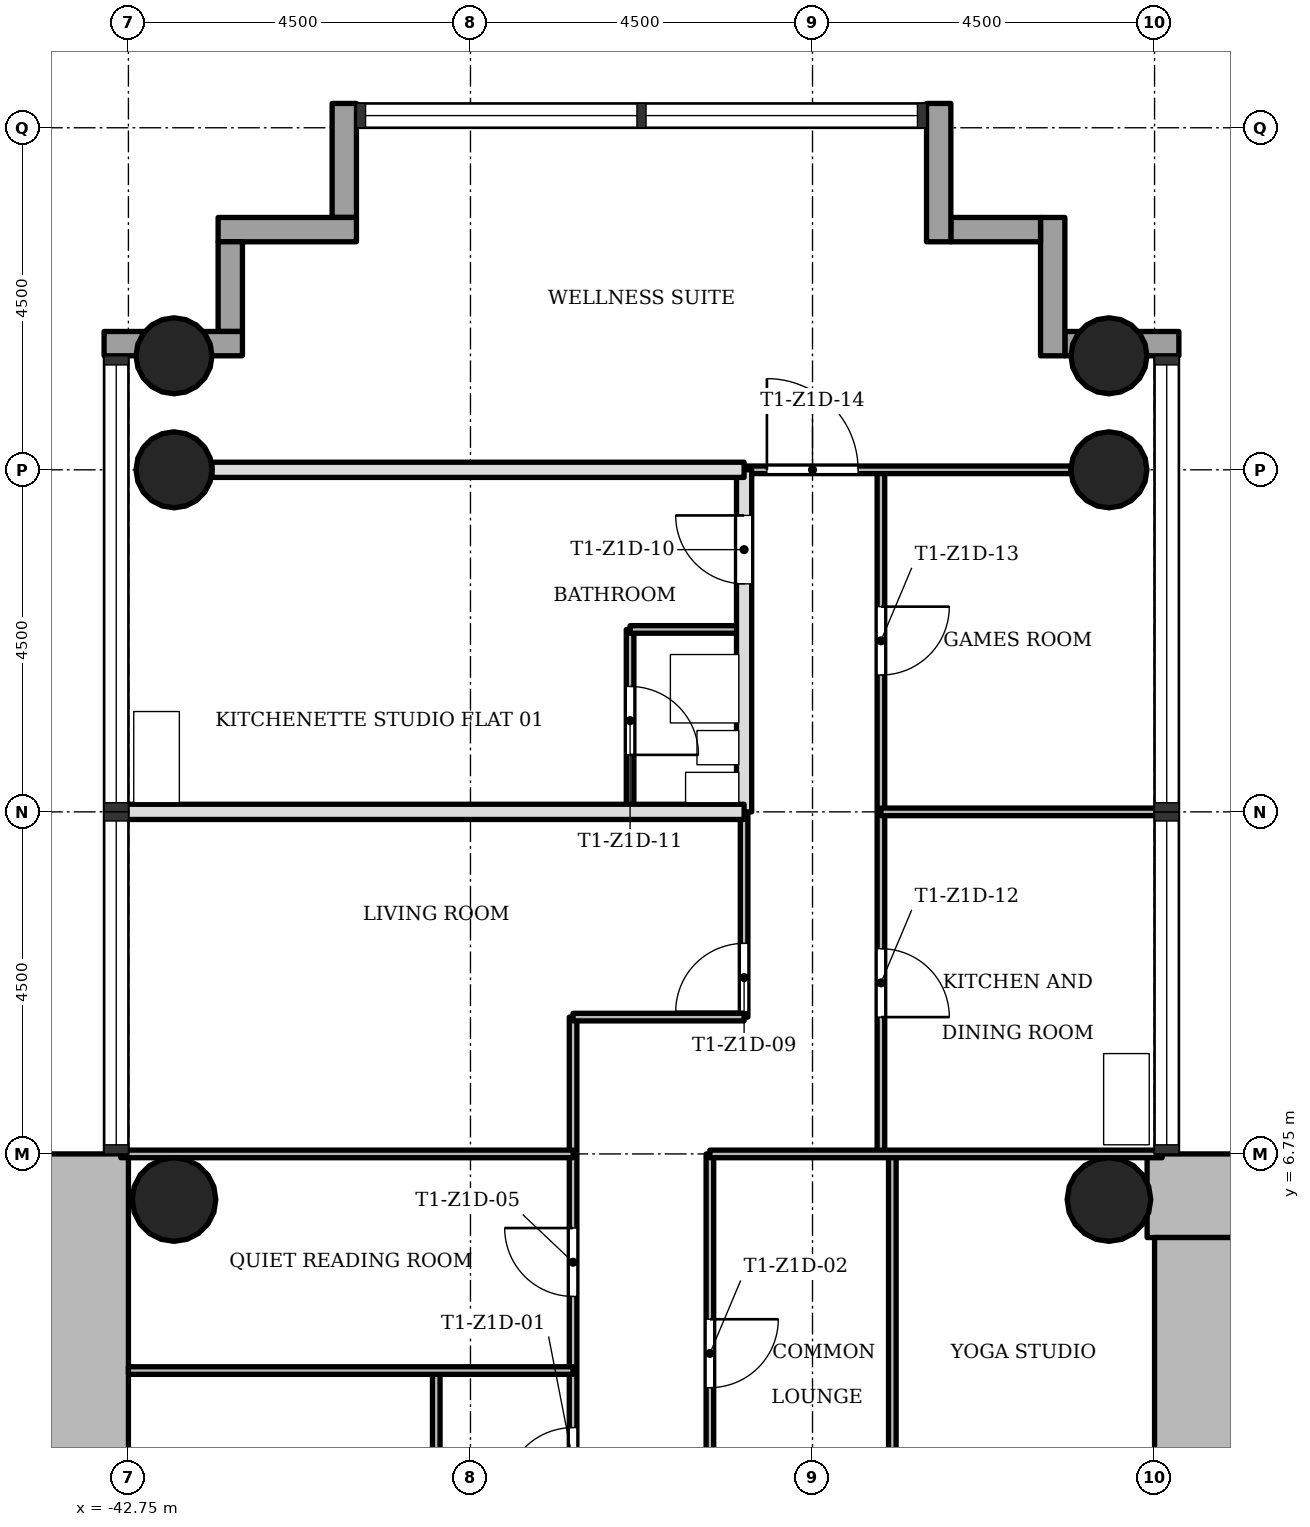
"""IFC4 building model, lengths in metres.
Left out: names, types, materials, properties, quantities, classifications, styles, units other than length and angle.
Written with IfcOpenShell. Run it as: python <this file> out.ifc"""

import sys

from ifc_helpers import new_model, si_unit, direction, frame, frame_2d, origin, origin_2d, place, context, subcontext, project, spatial, rectangle, hollow_circle, extrude, element, fill, save


model = new_model("IFC4")
c1 = context("Model", 3, precision=1e-05, world=origin(), true_north=direction((0.0, 1.0)))
c2 = subcontext(c1, "Body", "Model", "MODEL_VIEW")
j1 = project(units=[si_unit("LENGTHUNIT", "METRE"), si_unit("PLANEANGLEUNIT", "RADIAN")], contexts=[c1])
p1 = place(None, origin())
s1 = spatial("IfcSite", under=j1, at=p1, CompositionType="ELEMENT")
p2 = place(p1, origin())
s2 = spatial("IfcBuilding", under=s1, at=p2, CompositionType="ELEMENT")
p3 = place(p2, frame((0.0, 0.0, 61.9)))
s3 = spatial("IfcBuildingStorey", under=s2, at=p3, CompositionType="ELEMENT", Elevation=61.9)
p4 = place(p3, frame((-21.35, 6.2, 0.0), z_axis=(0.0, 0.0, 1.0), x_axis=(-1.0, 0.0, 0.0)))
e1 = element("IfcWall", 1, at=p4, inside=s3, PredefinedType="SHEAR", context=c2, shape_type="SweptSolid", body=[
    extrude(rectangle(XDim=7.998, YDim=1.1, at=frame_2d((3.999, 0.0))), origin(), (0.0, 0.0, 1.0), 3.4),
])
p5 = place(p3, frame((-28.7, 5.65, 0.0), z_axis=(0.0, 0.0, 1.0), x_axis=(0.0, -1.0, 0.0)))
e2 = element("IfcWall", 2, at=p5, inside=s3, PredefinedType="SHEAR", context=c2, shape_type="SweptSolid", body=[
    extrude(rectangle(XDim=12.4, YDim=1.1, at=frame_2d((6.2, 0.0))), origin(), (0.0, 0.0, 1.0), 3.4),
])
p6 = place(p5, frame((4.75, 0.0, 0.0)))
e3 = element("IfcOpeningElement", 3, at=p6, cuts=e2, PredefinedType="OPENING", context=c2, shape_type="SweptSolid", body=[
    extrude(rectangle(XDim=1.8, YDim=2.1, at=frame_2d((0.9, 1.05))), frame((0.0, 0.56, 0.0), z_axis=(0.0, -1.0, 0.0), x_axis=(1.0, 0.0, 0.0)), (0.0, 0.0, 1.0), 1.12),
])
p7 = place(p3, frame((-43.3, -5.65, 0.0), z_axis=(0.0, 0.0, 1.0), x_axis=(0.0, 1.0, 0.0)))
e4 = element("IfcWall", 4, at=p7, inside=s3, PredefinedType="SHEAR", context=c2, shape_type="SweptSolid", body=[
    extrude(rectangle(XDim=12.4, YDim=1.1, at=frame_2d((6.2, 0.0))), origin(), (0.0, 0.0, 1.0), 3.4),
])
p8 = place(p7, frame((4.75, 0.0, 0.0)))
e5 = element("IfcOpeningElement", 5, at=p8, cuts=e4, PredefinedType="OPENING", context=c2, shape_type="SweptSolid", body=[
    extrude(rectangle(XDim=1.8, YDim=2.1, at=frame_2d((0.9, 1.05))), frame((0.0, 0.56, 0.0), z_axis=(0.0, -1.0, 0.0), x_axis=(1.0, 0.0, 0.0)), (0.0, 0.0, 1.0), 1.12),
])
for number, where, z_axis, x_axis in (
    (6, (-29.85, 15.75, 0.0), (0.0, 0.0, 1.0), (1.0, 0.0, 0.0)),
    (7, (-42.15, 15.75, 0.0), (0.0, 0.0, 1.0), (1.0, 0.0, 0.0)),
    (8, (-29.85, 17.25, 0.0), (0.0, 0.0, 1.0), (1.0, 0.0, 0.0)),
    (9, (-42.15, 17.25, 0.0), (0.0, 0.0, 1.0), (1.0, 0.0, 0.0)),
):
    element("IfcColumn", number, at=place(p3, frame(where, z_axis=z_axis, x_axis=x_axis)), inside=s3, PredefinedType="COLUMN", context=c2, shape_type="SweptSolid", body=[
        extrude(hollow_circle(Radius=0.5, WallThickness=0.036, at=origin_2d()), origin(), (0.0, 0.0, 1.0), 3.4),
    ])
for number, where, z_axis, x_axis in (
    (10, (-29.85, 6.15, 0.0), (0.0, 0.0, 1.0), (1.0, 0.0, 0.0)),
    (11, (-42.15, 6.15, 0.0), (0.0, 0.0, 1.0), (1.0, 0.0, 0.0)),
):
    element("IfcColumn", number, at=place(p3, frame(where, z_axis=z_axis, x_axis=x_axis)), inside=s3, PredefinedType="COLUMN", context=c2, shape_type="SweptSolid", body=[
        extrude(hollow_circle(Radius=0.55, WallThickness=0.04, at=origin_2d()), origin(), (0.0, 0.0, 1.0), 3.4),
    ])
p9 = place(p3, frame((-28.93, 17.41, -0.3), z_axis=(0.0, 0.0, 1.0), x_axis=(-1.0, 0.0, 0.0)))
e12 = element("IfcWall", 12, at=p9, inside=s3, PredefinedType="STANDARD", context=c2, shape_type="SweptSolid", body=[
    extrude(rectangle(XDim=1.5, YDim=0.32, at=frame_2d((0.75, 0.0))), origin(), (0.0, 0.0, 1.0), 3.4),
])
p10 = place(p3, frame((-30.59, 17.25, -0.3), z_axis=(0.0, 0.0, 1.0), x_axis=(0.0, 1.0, 0.0)))
e13 = element("IfcWall", 13, at=p10, inside=s3, PredefinedType="STANDARD", context=c2, shape_type="SweptSolid", body=[
    extrude(rectangle(XDim=1.82, YDim=0.32, at=frame_2d((0.91, 0.0))), origin(), (0.0, 0.0, 1.0), 3.4),
])
p11 = place(p3, frame((-30.75, 18.91, -0.3), z_axis=(0.0, 0.0, 1.0), x_axis=(-1.0, 0.0, 0.0)))
e14 = element("IfcWall", 14, at=p11, inside=s3, PredefinedType="STANDARD", context=c2, shape_type="SweptSolid", body=[
    extrude(rectangle(XDim=1.18, YDim=0.32, at=frame_2d((0.59, 0.0))), origin(), (0.0, 0.0, 1.0), 3.4),
])
p12 = place(p3, frame((-32.09, 18.75, -0.3), z_axis=(0.0, 0.0, 1.0), x_axis=(0.0, 1.0, 0.0)))
e15 = element("IfcWall", 15, at=p12, inside=s3, PredefinedType="STANDARD", context=c2, shape_type="SweptSolid", body=[
    extrude(rectangle(XDim=1.82, YDim=0.32, at=frame_2d((0.91, 0.0))), origin(), (0.0, 0.0, 1.0), 3.4),
])
p13 = place(p3, frame((-39.91, 20.57, -0.3), z_axis=(0.0, 0.0, 1.0), x_axis=(0.0, -1.0, 0.0)))
e16 = element("IfcWall", 16, at=p13, inside=s3, PredefinedType="STANDARD", context=c2, shape_type="SweptSolid", body=[
    extrude(rectangle(XDim=1.5, YDim=0.32, at=frame_2d((0.75, 0.0))), origin(), (0.0, 0.0, 1.0), 3.4),
])
p14 = place(p3, frame((-39.75, 18.91, -0.3), z_axis=(0.0, 0.0, 1.0), x_axis=(-1.0, 0.0, 0.0)))
e17 = element("IfcWall", 17, at=p14, inside=s3, PredefinedType="STANDARD", context=c2, shape_type="SweptSolid", body=[
    extrude(rectangle(XDim=1.82, YDim=0.32, at=frame_2d((0.91, 0.0))), origin(), (0.0, 0.0, 1.0), 3.4),
])
p15 = place(p3, frame((-41.41, 18.75, -0.3), z_axis=(0.0, 0.0, 1.0), x_axis=(0.0, -1.0, 0.0)))
e18 = element("IfcWall", 18, at=p15, inside=s3, PredefinedType="STANDARD", context=c2, shape_type="SweptSolid", body=[
    extrude(rectangle(XDim=1.18, YDim=0.32, at=frame_2d((0.59, 0.0))), origin(), (0.0, 0.0, 1.0), 3.4),
])
p16 = place(p3, frame((-41.25, 17.41, -0.3), z_axis=(0.0, 0.0, 1.0), x_axis=(-1.0, 0.0, 0.0)))
e19 = element("IfcWall", 19, at=p16, inside=s3, PredefinedType="STANDARD", context=c2, shape_type="SweptSolid", body=[
    extrude(rectangle(XDim=1.82, YDim=0.32, at=frame_2d((0.91, 0.0))), origin(), (0.0, 0.0, 1.0), 3.4),
])
p17 = place(p3, frame((-38.7, 1.5, 0.0), z_axis=(0.0, 0.0, 1.0), x_axis=(0.0, 1.0, 0.0)))
e20 = element("IfcWall", 20, at=p17, inside=s3, PredefinedType="PARTITIONING", context=c2, shape_type="SweptSolid", body=[
    extrude(rectangle(XDim=2.4, YDim=0.1, at=frame_2d((1.2, 0.0))), origin(), (0.0, 0.0, 1.0), 3.0),
])
p18 = place(p3, frame((-36.9, 1.5, 0.0), z_axis=(0.0, 0.0, 1.0), x_axis=(0.0, 1.0, 0.0)))
e21 = element("IfcWall", 21, at=p18, inside=s3, PredefinedType="PARTITIONING", context=c2, shape_type="SweptSolid", body=[
    extrude(rectangle(XDim=7.05, YDim=0.1, at=frame_2d((3.525, 0.0))), origin(), (0.0, 0.0, 1.0), 3.0),
])
p19 = place(p18, frame((0.75, 0.0, 0.0)))
e22 = element("IfcOpeningElement", 22, at=p19, cuts=e21, PredefinedType="OPENING", context=c2, shape_type="SweptSolid", body=[
    extrude(rectangle(XDim=0.9, YDim=2.1, at=frame_2d((0.45, 1.05))), frame((0.0, 0.06, 0.0), z_axis=(0.0, -1.0, 0.0), x_axis=(1.0, 0.0, 0.0)), (0.0, 0.0, 1.0), 0.12),
])
p20 = place(p18, frame((3.375, 0.0, 0.0)))
e23 = element("IfcOpeningElement", 23, at=p20, cuts=e21, PredefinedType="OPENING", context=c2, shape_type="SweptSolid", body=[
    extrude(rectangle(XDim=0.9, YDim=2.1, at=frame_2d((0.45, 1.05))), frame((0.0, 0.06, 0.0), z_axis=(0.0, -1.0, 0.0), x_axis=(1.0, 0.0, 0.0)), (0.0, 0.0, 1.0), 0.12),
])
p21 = place(p3, frame((-36.15, 11.25, 0.0), z_axis=(0.0, 0.0, 1.0), x_axis=(0.0, 1.0, 0.0)))
e24 = element("IfcWall", 24, at=p21, inside=s3, PredefinedType="PARTITIONING", context=c2, shape_type="SweptSolid", body=[
    extrude(rectangle(XDim=2.4, YDim=0.1, at=frame_2d((1.2, 0.0))), origin(), (0.0, 0.0, 1.0), 3.0),
])
p22 = place(p21, frame((0.75, 0.0, 0.0)))
e25 = element("IfcOpeningElement", 25, at=p22, cuts=e24, PredefinedType="OPENING", context=c2, shape_type="SweptSolid", body=[
    extrude(rectangle(XDim=0.9, YDim=2.1, at=frame_2d((0.45, 1.05))), frame((0.0, 0.06, 0.0), z_axis=(0.0, -1.0, 0.0), x_axis=(1.0, 0.0, 0.0)), (0.0, 0.0, 1.0), 0.12),
])
p23 = place(p3, frame((-35.1, 1.5, 0.0), z_axis=(0.0, 0.0, 1.0), x_axis=(0.0, 1.0, 0.0)))
e26 = element("IfcWall", 26, at=p23, inside=s3, PredefinedType="PARTITIONING", context=c2, shape_type="SweptSolid", body=[
    extrude(rectangle(XDim=5.25, YDim=0.1, at=frame_2d((2.625, 0.0))), origin(), (0.0, 0.0, 1.0), 3.0),
])
p24 = place(p23, frame((2.175, 0.0, 0.0)))
e27 = element("IfcOpeningElement", 27, at=p24, cuts=e26, PredefinedType="OPENING", context=c2, shape_type="SweptSolid", body=[
    extrude(rectangle(XDim=0.9, YDim=2.1, at=frame_2d((0.45, 1.05))), frame((0.0, 0.06, 0.0), z_axis=(0.0, -1.0, 0.0), x_axis=(1.0, 0.0, 0.0)), (0.0, 0.0, 1.0), 0.12),
])
p25 = place(p3, frame((-34.65, 8.55, 0.0), z_axis=(0.0, 0.0, 1.0), x_axis=(0.0, 1.0, 0.0)))
e28 = element("IfcWall", 28, at=p25, inside=s3, PredefinedType="PARTITIONING", context=c2, shape_type="SweptSolid", body=[
    extrude(rectangle(XDim=2.7, YDim=0.1, at=frame_2d((1.35, 0.0))), origin(), (0.0, 0.0, 1.0), 3.0),
])
p26 = place(p25, frame((0.07, 0.0, 0.0)))
e29 = element("IfcOpeningElement", 29, at=p26, cuts=e28, PredefinedType="OPENING", context=c2, shape_type="SweptSolid", body=[
    extrude(rectangle(XDim=0.9, YDim=2.1, at=frame_2d((0.45, 1.05))), frame((0.0, 0.06, 0.0), z_axis=(0.0, -1.0, 0.0), x_axis=(1.0, 0.0, 0.0)), (0.0, 0.0, 1.0), 0.12),
])
p27 = place(p3, frame((-34.65, 11.25, 0.0), z_axis=(0.0, 0.0, 1.0), x_axis=(0.0, 1.0, 0.0)))
e30 = element("IfcWall", 30, at=p27, inside=s3, PredefinedType="SOLIDWALL", context=c2, shape_type="SweptSolid", body=[
    extrude(rectangle(XDim=4.5, YDim=0.2, at=frame_2d((2.25, 0.0))), origin(), (0.0, 0.0, 1.0), 3.0),
])
p28 = place(p27, frame((3.0, 0.0, 0.0)))
e31 = element("IfcOpeningElement", 31, at=p28, cuts=e30, PredefinedType="OPENING", context=c2, shape_type="SweptSolid", body=[
    extrude(rectangle(XDim=0.9, YDim=2.1, at=frame_2d((0.45, 1.05))), frame((0.0, 0.11, 0.0), z_axis=(0.0, -1.0, 0.0), x_axis=(1.0, 0.0, 0.0)), (0.0, 0.0, 1.0), 0.22),
])
p29 = place(p3, frame((-32.85, 6.75, 0.0), z_axis=(0.0, 0.0, 1.0), x_axis=(0.0, 1.0, 0.0)))
e32 = element("IfcWall", 32, at=p29, inside=s3, PredefinedType="PARTITIONING", context=c2, shape_type="SweptSolid", body=[
    extrude(rectangle(XDim=9.0, YDim=0.1, at=frame_2d((4.5, 0.0))), origin(), (0.0, 0.0, 1.0), 3.0),
])
p30 = place(p29, frame((1.8, 0.0, 0.0)))
e33 = element("IfcOpeningElement", 33, at=p30, cuts=e32, PredefinedType="OPENING", context=c2, shape_type="SweptSolid", body=[
    extrude(rectangle(XDim=0.9, YDim=2.1, at=frame_2d((0.45, 1.05))), frame((0.0, 0.06, 0.0), z_axis=(0.0, -1.0, 0.0), x_axis=(1.0, 0.0, 0.0)), (0.0, 0.0, 1.0), 0.12),
])
p31 = place(p29, frame((6.3, 0.0, 0.0)))
e34 = element("IfcOpeningElement", 34, at=p31, cuts=e32, PredefinedType="OPENING", context=c2, shape_type="SweptSolid", body=[
    extrude(rectangle(XDim=0.9, YDim=2.1, at=frame_2d((0.45, 1.05))), frame((0.0, 0.06, 0.0), z_axis=(0.0, -1.0, 0.0), x_axis=(1.0, 0.0, 0.0)), (0.0, 0.0, 1.0), 0.12),
])
p32 = place(p3, frame((-32.7, 1.5, 0.0), z_axis=(0.0, 0.0, 1.0), x_axis=(0.0, 1.0, 0.0)))
e35 = element("IfcWall", 35, at=p32, inside=s3, PredefinedType="PARTITIONING", context=c2, shape_type="SweptSolid", body=[
    extrude(rectangle(XDim=5.25, YDim=0.1, at=frame_2d((2.625, 0.0))), origin(), (0.0, 0.0, 1.0), 3.0),
])
p33 = place(p3, frame((-42.75, 3.9, 0.0), z_axis=(0.0, 0.0, 1.0), x_axis=(1.0, 0.0, 0.0)))
e36 = element("IfcWall", 36, at=p33, inside=s3, PredefinedType="PARTITIONING", context=c2, shape_type="SweptSolid", body=[
    extrude(rectangle(XDim=5.85, YDim=0.1, at=frame_2d((2.925, 0.0))), origin(), (0.0, 0.0, 1.0), 3.0),
])
for number, where, z_axis, x_axis in (
    (37, (-42.85, 6.75, 0.0), (0.0, 0.0, 1.0), (1.0, 0.0, 0.0)),
    (38, (-35.1, 6.75, 0.0), (0.0, 0.0, 1.0), (1.0, 0.0, 0.0)),
):
    element("IfcWall", number, at=place(p3, frame(where, z_axis=z_axis, x_axis=x_axis)), inside=s3, PredefinedType="PARTITIONING", context=c2, shape_type="SweptSolid", body=[
        extrude(rectangle(XDim=5.95, YDim=0.1, at=frame_2d((2.975, 0.0))), origin(), (0.0, 0.0, 1.0), 3.0),
    ])
p34 = place(p3, frame((-36.9, 8.55, 0.0), z_axis=(0.0, 0.0, 1.0), x_axis=(1.0, 0.0, 0.0)))
e39 = element("IfcWall", 39, at=p34, inside=s3, PredefinedType="PARTITIONING", context=c2, shape_type="SweptSolid", body=[
    extrude(rectangle(XDim=2.25, YDim=0.1, at=frame_2d((1.125, 0.0))), origin(), (0.0, 0.0, 1.0), 3.0),
])
p35 = place(p3, frame((-32.85, 11.25, 0.0), z_axis=(0.0, 0.0, 1.0), x_axis=(1.0, 0.0, 0.0)))
e40 = element("IfcWall", 40, at=p35, inside=s3, PredefinedType="PARTITIONING", context=c2, shape_type="SweptSolid", body=[
    extrude(rectangle(XDim=3.7, YDim=0.1, at=frame_2d((1.85, 0.0))), origin(), (0.0, 0.0, 1.0), 3.0),
])
p36 = place(p3, frame((-42.85, 11.25, 0.0), z_axis=(0.0, 0.0, 1.0), x_axis=(1.0, 0.0, 0.0)))
e41 = element("IfcWall", 41, at=p36, inside=s3, PredefinedType="SOLIDWALL", context=c2, shape_type="SweptSolid", body=[
    extrude(rectangle(XDim=8.2, YDim=0.2, at=frame_2d((4.1, 0.0))), origin(), (0.0, 0.0, 1.0), 3.0),
])
p37 = place(p3, frame((-36.15, 13.65, 0.0), z_axis=(0.0, 0.0, 1.0), x_axis=(1.0, 0.0, 0.0)))
e42 = element("IfcWall", 42, at=p37, inside=s3, PredefinedType="PARTITIONING", context=c2, shape_type="SweptSolid", body=[
    extrude(rectangle(XDim=1.5, YDim=0.1, at=frame_2d((0.75, 0.0))), origin(), (0.0, 0.0, 1.0), 3.0),
])
p38 = place(p3, frame((-34.65, 15.75, 0.0), z_axis=(0.0, 0.0, 1.0), x_axis=(1.0, 0.0, 0.0)))
e43 = element("IfcWall", 43, at=p38, inside=s3, PredefinedType="PARTITIONING", context=c2, shape_type="SweptSolid", body=[
    extrude(rectangle(XDim=4.3, YDim=0.1, at=frame_2d((2.15, 0.0))), origin(), (0.0, 0.0, 1.0), 3.0),
])
p39 = place(p38, frame((0.3, 0.0, 0.0)))
e44 = element("IfcOpeningElement", 44, at=p39, cuts=e43, PredefinedType="OPENING", context=c2, shape_type="SweptSolid", body=[
    extrude(rectangle(XDim=1.2, YDim=2.1, at=frame_2d((0.6, 1.05))), frame((0.0, 0.06, 0.0), z_axis=(0.0, -1.0, 0.0), x_axis=(1.0, 0.0, 0.0)), (0.0, 0.0, 1.0), 0.12),
])
p40 = place(p3, frame((-41.65, 15.75, 0.0), z_axis=(0.0, 0.0, 1.0), x_axis=(1.0, 0.0, 0.0)))
e45 = element("IfcWall", 45, at=p40, inside=s3, PredefinedType="SOLIDWALL", context=c2, shape_type="SweptSolid", body=[
    extrude(rectangle(XDim=7.0, YDim=0.2, at=frame_2d((3.5, 0.0))), origin(), (0.0, 0.0, 1.0), 3.0),
])
p41 = place(p19, origin())
e46 = element("IfcDoor", 46, at=p41, inside=s3, OperationType="SINGLE_SWING_RIGHT", PredefinedType="DOOR", context=c2, shape_type="SweptSolid", body=[
    extrude(rectangle(XDim=0.9, YDim=2.1, at=frame_2d((0.45, 1.05))), frame((0.0, 0.025, 0.0), z_axis=(0.0, -1.0, 0.0), x_axis=(1.0, 0.0, 0.0)), (0.0, 0.0, 1.0), 0.05),
])
fill(e22, e46)
p42 = place(p24, origin())
e47 = element("IfcDoor", 47, at=p42, inside=s3, OperationType="SINGLE_SWING_RIGHT", PredefinedType="DOOR", context=c2, shape_type="SweptSolid", body=[
    extrude(rectangle(XDim=0.9, YDim=2.1, at=frame_2d((0.45, 1.05))), frame((0.0, 0.025, 0.0), z_axis=(0.0, -1.0, 0.0), x_axis=(1.0, 0.0, 0.0)), (0.0, 0.0, 1.0), 0.05),
])
fill(e27, e47)
p43 = place(p20, origin())
e48 = element("IfcDoor", 48, at=p43, inside=s3, OperationType="SINGLE_SWING_LEFT", PredefinedType="DOOR", context=c2, shape_type="SweptSolid", body=[
    extrude(rectangle(XDim=0.9, YDim=2.1, at=frame_2d((0.45, 1.05))), frame((0.0, 0.025, 0.0), z_axis=(0.0, -1.0, 0.0), x_axis=(1.0, 0.0, 0.0)), (0.0, 0.0, 1.0), 0.05),
])
fill(e23, e48)
p44 = place(p26, origin())
e49 = element("IfcDoor", 49, at=p44, inside=s3, OperationType="SINGLE_SWING_RIGHT", PredefinedType="DOOR", context=c2, shape_type="SweptSolid", body=[
    extrude(rectangle(XDim=0.9, YDim=2.1, at=frame_2d((0.45, 1.05))), frame((0.0, 0.025, 0.0), z_axis=(0.0, -1.0, 0.0), x_axis=(1.0, 0.0, 0.0)), (0.0, 0.0, 1.0), 0.05),
])
fill(e29, e49)
p45 = place(p28, origin())
e50 = element("IfcDoor", 50, at=p45, inside=s3, OperationType="SINGLE_SWING_LEFT", PredefinedType="DOOR", context=c2, shape_type="SweptSolid", body=[
    extrude(rectangle(XDim=0.9, YDim=2.1, at=frame_2d((0.45, 1.05))), frame((0.0, 0.025, 0.0), z_axis=(0.0, -1.0, 0.0), x_axis=(1.0, 0.0, 0.0)), (0.0, 0.0, 1.0), 0.05),
])
fill(e31, e50)
p46 = place(p22, origin())
e51 = element("IfcDoor", 51, at=p46, inside=s3, OperationType="SINGLE_SWING_LEFT", PredefinedType="DOOR", context=c2, shape_type="SweptSolid", body=[
    extrude(rectangle(XDim=0.9, YDim=2.1, at=frame_2d((0.45, 1.05))), frame((0.0, 0.025, 0.0), z_axis=(0.0, -1.0, 0.0), x_axis=(1.0, 0.0, 0.0)), (0.0, 0.0, 1.0), 0.05),
])
fill(e25, e51)
p47 = place(p30, origin())
e52 = element("IfcDoor", 52, at=p47, inside=s3, OperationType="SINGLE_SWING_LEFT", PredefinedType="DOOR", context=c2, shape_type="SweptSolid", body=[
    extrude(rectangle(XDim=0.9, YDim=2.1, at=frame_2d((0.45, 1.05))), frame((0.0, 0.025, 0.0), z_axis=(0.0, -1.0, 0.0), x_axis=(1.0, 0.0, 0.0)), (0.0, 0.0, 1.0), 0.05),
])
fill(e33, e52)
p48 = place(p31, origin())
e53 = element("IfcDoor", 53, at=p48, inside=s3, OperationType="SINGLE_SWING_RIGHT", PredefinedType="DOOR", context=c2, shape_type="SweptSolid", body=[
    extrude(rectangle(XDim=0.9, YDim=2.1, at=frame_2d((0.45, 1.05))), frame((0.0, 0.025, 0.0), z_axis=(0.0, -1.0, 0.0), x_axis=(1.0, 0.0, 0.0)), (0.0, 0.0, 1.0), 0.05),
])
fill(e34, e53)
p49 = place(p39, origin())
e54 = element("IfcDoor", 54, at=p49, inside=s3, OperationType="SINGLE_SWING_RIGHT", PredefinedType="DOOR", context=c2, shape_type="SweptSolid", body=[
    extrude(rectangle(XDim=1.2, YDim=2.1, at=frame_2d((0.6, 1.05))), frame((0.0, 0.025, 0.0), z_axis=(0.0, -1.0, 0.0), x_axis=(1.0, 0.0, 0.0)), (0.0, 0.0, 1.0), 0.05),
])
fill(e44, e54)
save(model, sys.argv[1])
